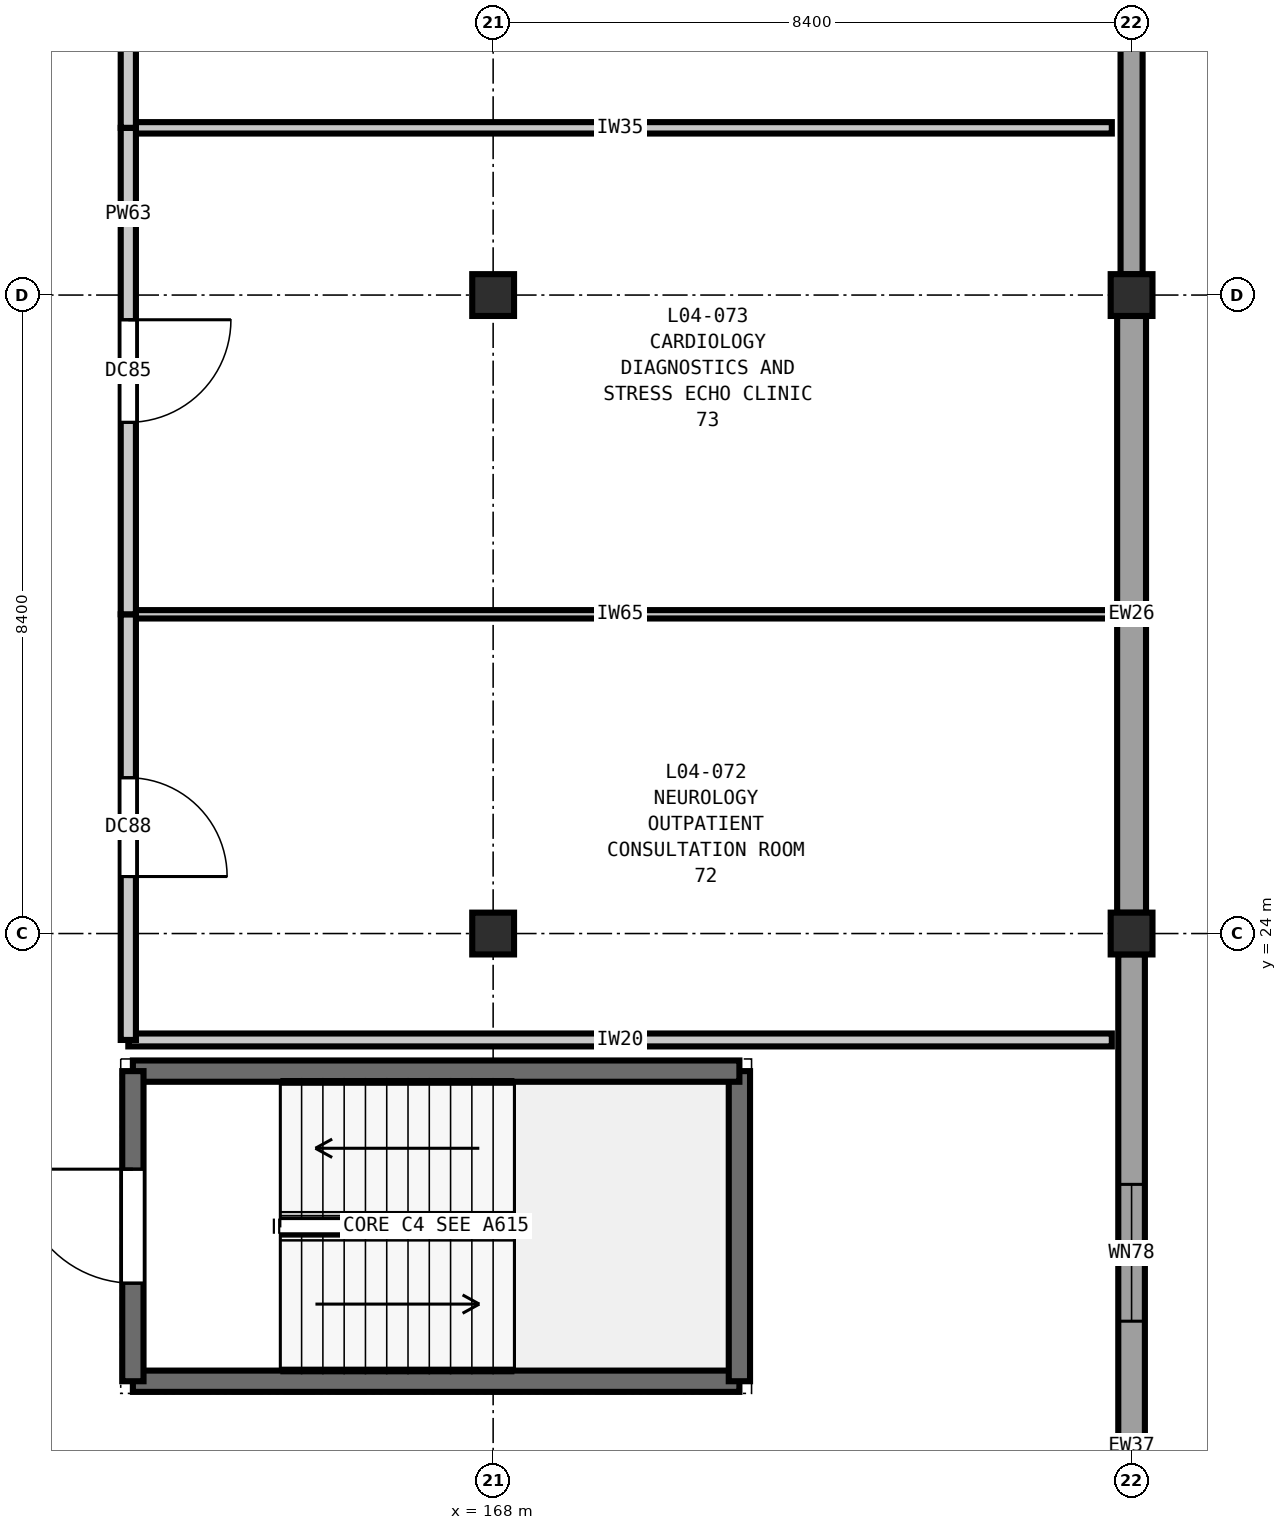
"""IFC4 building model, lengths in metres.
Left out: names, types, materials, properties, quantities, classifications, styles, units other than length and angle.
Written with IfcOpenShell. Run it as: python <this file> out.ifc"""

import sys

from ifc_helpers import new_model, si_unit, direction, frame, frame_2d, origin, origin_2d, place, context, subcontext, project, spatial, rectangle, extrude, element, fill, save


model = new_model("IFC4")
c1 = context("Model", 3, precision=1e-05, world=origin(), true_north=direction((0.0, 1.0)))
c2 = subcontext(c1, "Body", "Model", "MODEL_VIEW")
j1 = project(units=[si_unit("LENGTHUNIT", "METRE"), si_unit("PLANEANGLEUNIT", "RADIAN")], contexts=[c1])
p1 = place(None, origin())
s1 = spatial("IfcSite", under=j1, at=p1, CompositionType="ELEMENT")
p2 = place(p1, origin())
s2 = spatial("IfcBuilding", under=s1, at=p2, CompositionType="ELEMENT")
p3 = place(p2, frame((0.0, 0.0, 20.4)))
s3 = spatial("IfcBuildingStorey", under=s2, at=p3, CompositionType="ELEMENT", Elevation=20.4)
for number, where, z_axis, x_axis in (
    (1, (168.0, 24.0, 0.0), (0.0, 0.0, 1.0), (1.0, 0.0, 0.0)),
    (2, (168.0, 32.4, 0.0), (0.0, 0.0, 1.0), (1.0, 0.0, 0.0)),
    (3, (176.4, 24.0, 0.0), (0.0, 0.0, 1.0), (1.0, 0.0, 0.0)),
    (4, (176.4, 32.4, 0.0), (0.0, 0.0, 1.0), (1.0, 0.0, 0.0)),
):
    element("IfcColumn", number, at=place(p3, frame(where, z_axis=z_axis, x_axis=x_axis)), inside=s3, PredefinedType="COLUMN", context=c2, shape_type="SweptSolid", body=[
        extrude(rectangle(XDim=0.55, YDim=0.55, at=origin_2d()), origin(), (0.0, 0.0, 1.0), 4.2),
    ])
p4 = place(p3, frame((176.4, 40.527, 0.0), z_axis=(0.0, 0.0, 1.0), x_axis=(0.0, -1.0, 0.0)))
e5 = element("IfcWall", 5, at=p4, inside=s3, PredefinedType="SOLIDWALL", context=c2, shape_type="SweptSolid", body=[
    extrude(rectangle(XDim=7.854, YDim=0.29, at=frame_2d((3.927, 0.0))), origin(), (0.0, 0.0, 1.0), 3.48),
])
p5 = place(p4, frame((3.127, 0.0, 0.9)))
e6 = element("IfcOpeningElement", 6, at=p5, cuts=e5, PredefinedType="OPENING", context=c2, shape_type="SweptSolid", body=[
    extrude(rectangle(XDim=1.6, YDim=1.95, at=frame_2d((0.8, 0.975))), frame((0.0, 0.155, 0.0), z_axis=(0.0, -1.0, 0.0), x_axis=(1.0, 0.0, 0.0)), (0.0, 0.0, 1.0), 0.31),
])
p6 = place(p3, frame((176.4, 32.127, 0.0), z_axis=(0.0, 0.0, 1.0), x_axis=(0.0, -1.0, 0.0)))
e7 = element("IfcWall", 7, at=p6, inside=s3, PredefinedType="SOLIDWALL", context=c2, shape_type="SweptSolid", body=[
    extrude(rectangle(XDim=7.854, YDim=0.38, at=frame_2d((3.927, 0.0))), origin(), (0.0, 0.0, 1.0), 3.48),
])
p7 = place(p3, frame((176.4, 23.727, 0.0), z_axis=(0.0, 0.0, 1.0), x_axis=(0.0, -1.0, 0.0)))
e8 = element("IfcWall", 8, at=p7, inside=s3, PredefinedType="SOLIDWALL", context=c2, shape_type="SweptSolid", body=[
    extrude(rectangle(XDim=7.854, YDim=0.35, at=frame_2d((3.927, 0.0))), origin(), (0.0, 0.0, 1.0), 3.48),
])
p8 = place(p7, frame((3.027, 0.0, 0.9)))
e9 = element("IfcOpeningElement", 9, at=p8, cuts=e8, PredefinedType="OPENING", context=c2, shape_type="SweptSolid", body=[
    extrude(rectangle(XDim=1.8, YDim=1.95, at=frame_2d((0.9, 0.975))), frame((0.0, 0.185, 0.0), z_axis=(0.0, -1.0, 0.0), x_axis=(1.0, 0.0, 0.0)), (0.0, 0.0, 1.0), 0.37),
])
p9 = place(p3, frame((163.26, 18.11, 0.0), z_axis=(0.0, 0.0, 1.0), x_axis=(1.0, 0.0, 0.0)))
e10 = element("IfcWall", 10, at=p9, inside=s3, PredefinedType="SHEAR", context=c2, shape_type="SweptSolid", body=[
    extrude(rectangle(XDim=7.98, YDim=0.28, at=frame_2d((3.99, 0.0))), origin(), (0.0, 0.0, 1.0), 4.2),
])
p10 = place(p3, frame((171.24, 18.11, 0.0), z_axis=(0.0, 0.0, 1.0), x_axis=(0.0, 1.0, 0.0)))
e11 = element("IfcWall", 11, at=p10, inside=s3, PredefinedType="SHEAR", context=c2, shape_type="SweptSolid", body=[
    extrude(rectangle(XDim=4.08, YDim=0.28, at=frame_2d((2.04, 0.0))), origin(), (0.0, 0.0, 1.0), 4.2),
])
p11 = place(p3, frame((171.24, 22.19, 0.0), z_axis=(0.0, 0.0, 1.0), x_axis=(-1.0, 0.0, 0.0)))
e12 = element("IfcWall", 12, at=p11, inside=s3, PredefinedType="SHEAR", context=c2, shape_type="SweptSolid", body=[
    extrude(rectangle(XDim=7.98, YDim=0.28, at=frame_2d((3.99, 0.0))), origin(), (0.0, 0.0, 1.0), 4.2),
])
p12 = place(p3, frame((163.26, 22.19, 0.0), z_axis=(0.0, 0.0, 1.0), x_axis=(0.0, -1.0, 0.0)))
e13 = element("IfcWall", 13, at=p12, inside=s3, PredefinedType="SHEAR", context=c2, shape_type="SweptSolid", body=[
    extrude(rectangle(XDim=4.08, YDim=0.28, at=frame_2d((2.04, 0.0))), origin(), (0.0, 0.0, 1.0), 4.2),
])
p13 = place(p12, frame((1.29, 0.0, 0.0)))
e14 = element("IfcOpeningElement", 14, at=p13, cuts=e13, PredefinedType="OPENING", context=c2, shape_type="SweptSolid", body=[
    extrude(rectangle(XDim=1.5, YDim=2.2, at=frame_2d((0.75, 1.1))), frame((0.0, 0.15, 0.0), z_axis=(0.0, -1.0, 0.0), x_axis=(1.0, 0.0, 0.0)), (0.0, 0.0, 1.0), 0.3),
])
p14 = place(p3, frame((163.2, 22.6, 0.0), z_axis=(0.0, 0.0, 1.0), x_axis=(1.0, 0.0, 0.0)))
e15 = element("IfcWall", 15, at=p14, inside=s3, PredefinedType="PARTITIONING", context=c2, shape_type="SweptSolid", body=[
    extrude(rectangle(XDim=12.94, YDim=0.17, at=frame_2d((6.47, 0.0))), origin(), (0.0, 0.0, 1.0), 3.82),
])
p15 = place(p3, frame((163.2, 28.2, 0.0), z_axis=(0.0, 0.0, 1.0), x_axis=(1.0, 0.0, 0.0)))
e16 = element("IfcWall", 16, at=p15, inside=s3, PredefinedType="PARTITIONING", context=c2, shape_type="SweptSolid", body=[
    extrude(rectangle(XDim=12.94, YDim=0.11, at=frame_2d((6.47, 0.0))), origin(), (0.0, 0.0, 1.0), 3.82),
])
p16 = place(p3, frame((163.2, 34.6, 0.0), z_axis=(0.0, 0.0, 1.0), x_axis=(1.0, 0.0, 0.0)))
e17 = element("IfcWall", 17, at=p16, inside=s3, PredefinedType="PARTITIONING", context=c2, shape_type="SweptSolid", body=[
    extrude(rectangle(XDim=12.94, YDim=0.15, at=frame_2d((6.47, 0.0))), origin(), (0.0, 0.0, 1.0), 3.82),
])
p17 = place(p3, frame((163.2, 22.6, 0.0), z_axis=(0.0, 0.0, 1.0), x_axis=(0.0, 1.0, 0.0)))
e18 = element("IfcWall", 18, at=p17, inside=s3, PredefinedType="PARTITIONING", context=c2, shape_type="SweptSolid", body=[
    extrude(rectangle(XDim=5.6, YDim=0.2, at=frame_2d((2.8, 0.0))), origin(), (0.0, 0.0, 1.0), 3.82),
])
p18 = place(p17, frame((2.15, 0.0, 0.0)))
e19 = element("IfcOpeningElement", 19, at=p18, cuts=e18, PredefinedType="OPENING", context=c2, shape_type="SweptSolid", body=[
    extrude(rectangle(XDim=1.3, YDim=2.2, at=frame_2d((0.65, 1.1))), frame((0.0, 0.11, 0.0), z_axis=(0.0, -1.0, 0.0), x_axis=(1.0, 0.0, 0.0)), (0.0, 0.0, 1.0), 0.22),
])
p19 = place(p3, frame((163.2, 28.2, 0.0), z_axis=(0.0, 0.0, 1.0), x_axis=(0.0, 1.0, 0.0)))
e20 = element("IfcWall", 20, at=p19, inside=s3, PredefinedType="PARTITIONING", context=c2, shape_type="SweptSolid", body=[
    extrude(rectangle(XDim=6.4, YDim=0.2, at=frame_2d((3.2, 0.0))), origin(), (0.0, 0.0, 1.0), 3.82),
])
p20 = place(p19, frame((2.525, 0.0, 0.0)))
e21 = element("IfcOpeningElement", 21, at=p20, cuts=e20, PredefinedType="OPENING", context=c2, shape_type="SweptSolid", body=[
    extrude(rectangle(XDim=1.35, YDim=2.2, at=frame_2d((0.675, 1.1))), frame((0.0, 0.11, 0.0), z_axis=(0.0, -1.0, 0.0), x_axis=(1.0, 0.0, 0.0)), (0.0, 0.0, 1.0), 0.22),
])
p21 = place(p3, frame((163.2, 34.6, 0.0), z_axis=(0.0, 0.0, 1.0), x_axis=(0.0, 1.0, 0.0)))
e22 = element("IfcWall", 22, at=p21, inside=s3, PredefinedType="PARTITIONING", context=c2, shape_type="SweptSolid", body=[
    extrude(rectangle(XDim=5.6, YDim=0.2, at=frame_2d((2.8, 0.0))), origin(), (0.0, 0.0, 1.0), 3.82),
])
p22 = place(p21, frame((2.075, 0.0, 0.0)))
e23 = element("IfcOpeningElement", 23, at=p22, cuts=e22, PredefinedType="OPENING", context=c2, shape_type="SweptSolid", body=[
    extrude(rectangle(XDim=1.45, YDim=2.25, at=frame_2d((0.725, 1.125))), frame((0.0, 0.11, 0.0), z_axis=(0.0, -1.0, 0.0), x_axis=(1.0, 0.0, 0.0)), (0.0, 0.0, 1.0), 0.22),
])
p23 = place(p8, origin())
e24 = element("IfcWindow", 24, at=p23, inside=s3, PartitioningType="DOUBLE_PANEL_VERTICAL", PredefinedType="WINDOW", context=c2, shape_type="SweptSolid", body=[
    extrude(rectangle(XDim=1.8, YDim=1.95, at=frame_2d((0.9, 0.975))), frame((0.0, 0.03, 0.0), z_axis=(0.0, -1.0, 0.0), x_axis=(1.0, 0.0, 0.0)), (0.0, 0.0, 1.0), 0.06),
])
fill(e9, e24)
p24 = place(p13, frame((1.5, 0.0, 0.0), z_axis=(0.0, 0.0, 1.0), x_axis=(-1.0, 0.0, 0.0)))
e25 = element("IfcDoor", 25, at=p24, inside=s3, OperationType="SINGLE_SWING_RIGHT", PredefinedType="DOOR", context=c2, shape_type="SweptSolid", body=[
    extrude(rectangle(XDim=1.5, YDim=2.2, at=frame_2d((0.75, 1.1))), frame((0.0, 0.025, 0.0), z_axis=(0.0, -1.0, 0.0), x_axis=(1.0, 0.0, 0.0)), (0.0, 0.0, 1.0), 0.05),
])
fill(e14, e25)
p25 = place(p18, frame((1.3, 0.0, 0.0), z_axis=(0.0, 0.0, 1.0), x_axis=(-1.0, 0.0, 0.0)))
e26 = element("IfcDoor", 26, at=p25, inside=s3, OperationType="SINGLE_SWING_RIGHT", PredefinedType="DOOR", context=c2, shape_type="SweptSolid", body=[
    extrude(rectangle(XDim=1.3, YDim=2.2, at=frame_2d((0.65, 1.1))), frame((0.0, 0.025, 0.0), z_axis=(0.0, -1.0, 0.0), x_axis=(1.0, 0.0, 0.0)), (0.0, 0.0, 1.0), 0.05),
])
fill(e19, e26)
p26 = place(p20, frame((1.35, 0.0, 0.0), z_axis=(0.0, 0.0, 1.0), x_axis=(-1.0, 0.0, 0.0)))
e27 = element("IfcDoor", 27, at=p26, inside=s3, OperationType="SINGLE_SWING_LEFT", PredefinedType="DOOR", context=c2, shape_type="SweptSolid", body=[
    extrude(rectangle(XDim=1.35, YDim=2.2, at=frame_2d((0.675, 1.1))), frame((0.0, 0.025, 0.0), z_axis=(0.0, -1.0, 0.0), x_axis=(1.0, 0.0, 0.0)), (0.0, 0.0, 1.0), 0.05),
])
fill(e21, e27)
save(model, sys.argv[1])
